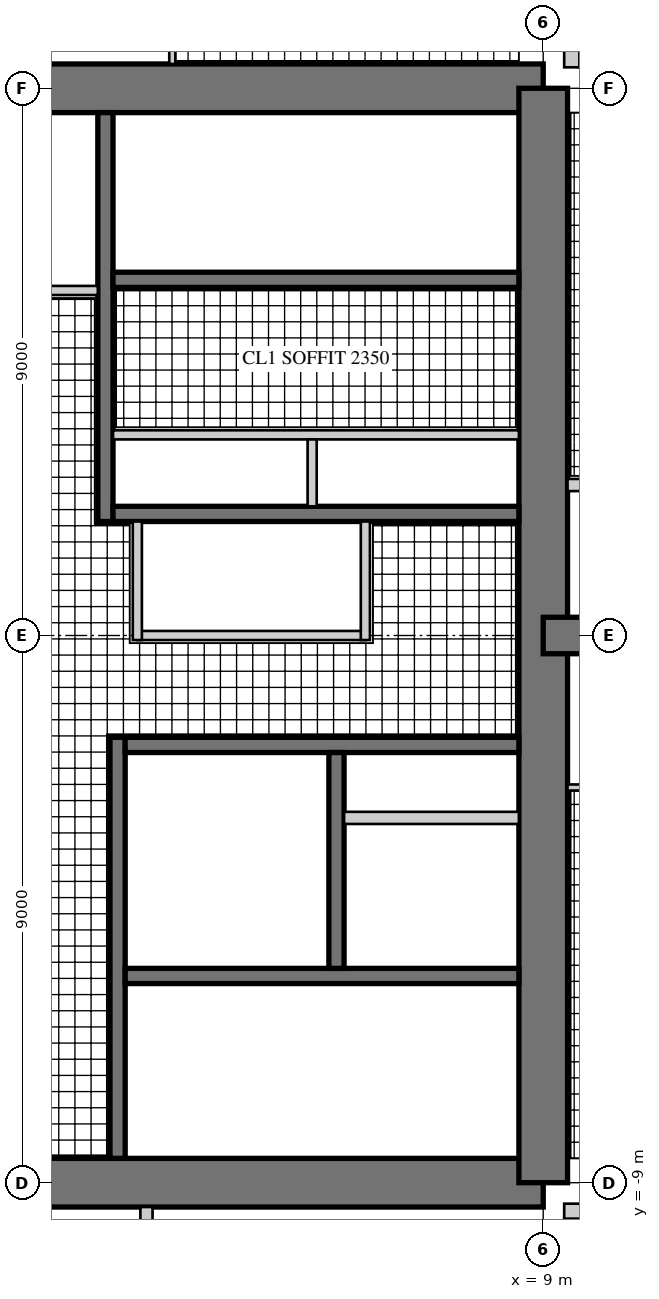
"""IFC4 building model, lengths in metres.
Left out: names, types, materials, properties, quantities, classifications, styles, units other than length and angle.
Written with IfcOpenShell. Run it as: python <this file> out.ifc"""

import sys

from ifc_helpers import new_model, si_unit, direction, frame, frame_2d, origin, place, context, subcontext, project, spatial, rectangle, extrude, element, fill, save


model = new_model("IFC4")
c1 = context("Model", 3, precision=1e-05, world=origin(), true_north=direction((0.0, 1.0)))
c2 = subcontext(c1, "Body", "Model", "MODEL_VIEW")
j1 = project(units=[si_unit("LENGTHUNIT", "METRE"), si_unit("PLANEANGLEUNIT", "RADIAN")], contexts=[c1])
p1 = place(None, origin())
s1 = spatial("IfcSite", under=j1, at=p1, CompositionType="ELEMENT")
p2 = place(p1, origin())
s2 = spatial("IfcBuilding", under=s1, at=p2, CompositionType="ELEMENT")
p3 = place(p2, frame((0.0, 0.0, 267.9)))
s3 = spatial("IfcBuildingStorey", under=s2, at=p3, CompositionType="ELEMENT", Elevation=267.9)
p4 = place(p3, frame((9.0, 9.0, 0.0), z_axis=(0.0, 0.0, 1.0), x_axis=(-1.0, 0.0, 0.0)))
e1 = element("IfcWall", 1, at=p4, inside=s3, PredefinedType="SHEAR", context=c2, shape_type="SweptSolid", body=[
    extrude(rectangle(XDim=18.0, YDim=0.8, at=frame_2d((9.0, 0.0))), origin(), (0.0, 0.0, 1.0), 3.4),
])
p5 = place(p4, frame((9.8, 0.0, 0.0)))
e2 = element("IfcOpeningElement", 2, at=p5, cuts=e1, PredefinedType="OPENING", context=c2, shape_type="SweptSolid", body=[
    extrude(rectangle(XDim=1.0, YDim=2.4, at=frame_2d((0.5, 1.2))), frame((0.0, 0.41, 0.0), z_axis=(0.0, -1.0, 0.0), x_axis=(1.0, 0.0, 0.0)), (0.0, 0.0, 1.0), 0.82),
])
p6 = place(p3, frame((-9.0, -9.0, 0.0), z_axis=(0.0, 0.0, 1.0), x_axis=(1.0, 0.0, 0.0)))
e3 = element("IfcWall", 3, at=p6, inside=s3, PredefinedType="SHEAR", context=c2, shape_type="SweptSolid", body=[
    extrude(rectangle(XDim=18.0, YDim=0.8, at=frame_2d((9.0, 0.0))), origin(), (0.0, 0.0, 1.0), 3.4),
])
p7 = place(p6, frame((9.8, 0.0, 0.0)))
e4 = element("IfcOpeningElement", 4, at=p7, cuts=e3, PredefinedType="OPENING", context=c2, shape_type="SweptSolid", body=[
    extrude(rectangle(XDim=1.0, YDim=2.4, at=frame_2d((0.5, 1.2))), frame((0.0, 0.41, 0.0), z_axis=(0.0, -1.0, 0.0), x_axis=(1.0, 0.0, 0.0)), (0.0, 0.0, 1.0), 0.82),
])
p8 = place(p3, frame((9.0, -9.0, 0.0), z_axis=(0.0, 0.0, 1.0), x_axis=(0.0, 1.0, 0.0)))
e5 = element("IfcWall", 5, at=p8, inside=s3, PredefinedType="SHEAR", context=c2, shape_type="SweptSolid", body=[
    extrude(rectangle(XDim=18.0, YDim=0.8, at=frame_2d((9.0, 0.0))), origin(), (0.0, 0.0, 1.0), 3.4),
])
p9 = place(p8, frame((9.8, 0.0, 0.0)))
e6 = element("IfcOpeningElement", 6, at=p9, cuts=e5, PredefinedType="OPENING", context=c2, shape_type="SweptSolid", body=[
    extrude(rectangle(XDim=1.0, YDim=2.4, at=frame_2d((0.5, 1.2))), frame((0.0, 0.41, 0.0), z_axis=(0.0, -1.0, 0.0), x_axis=(1.0, 0.0, 0.0)), (0.0, 0.0, 1.0), 0.82),
])
p10 = place(p3, frame((1.8, 1.875, 0.0), z_axis=(0.0, 0.0, 1.0), x_axis=(0.0, 1.0, 0.0)))
e7 = element("IfcWall", 7, at=p10, inside=s3, PredefinedType="SHEAR", context=c2, shape_type="SweptSolid", body=[
    extrude(rectangle(XDim=6.725, YDim=0.25, at=frame_2d((3.363, 0.0))), origin(), (0.0, 0.0, 1.0), 3.4),
])
p11 = place(p10, frame((1.875, 0.0, 0.0)))
e8 = element("IfcOpeningElement", 8, at=p11, cuts=e7, PredefinedType="OPENING", context=c2, shape_type="SweptSolid", body=[
    extrude(rectangle(XDim=1.6, YDim=2.4, at=frame_2d((0.8, 1.2))), frame((0.0, 0.135, 0.0), z_axis=(0.0, -1.0, 0.0), x_axis=(1.0, 0.0, 0.0)), (0.0, 0.0, 1.0), 0.27),
])
p12 = place(p3, frame((1.925, 2.0, 0.0), z_axis=(0.0, 0.0, 1.0), x_axis=(1.0, 0.0, 0.0)))
e9 = element("IfcWall", 9, at=p12, inside=s3, PredefinedType="SHEAR", context=c2, shape_type="SweptSolid", body=[
    extrude(rectangle(XDim=6.675, YDim=0.25, at=frame_2d((3.337, 0.0))), origin(), (0.0, 0.0, 1.0), 3.4),
])
p13 = place(p3, frame((1.925, 5.85, 0.0), z_axis=(0.0, 0.0, 1.0), x_axis=(1.0, 0.0, 0.0)))
e10 = element("IfcWall", 10, at=p13, inside=s3, PredefinedType="SHEAR", context=c2, shape_type="SweptSolid", body=[
    extrude(rectangle(XDim=6.675, YDim=0.25, at=frame_2d((3.337, 0.0))), origin(), (0.0, 0.0, 1.0), 3.4),
])
p14 = place(p13, frame((0.546, 0.0, 0.0)))
e11 = element("IfcOpeningElement", 11, at=p14, cuts=e10, PredefinedType="OPENING", context=c2, shape_type="SweptSolid", body=[
    extrude(rectangle(XDim=1.0, YDim=2.1, at=frame_2d((0.5, 1.05))), frame((0.0, 0.135, 0.0), z_axis=(0.0, -1.0, 0.0), x_axis=(1.0, 0.0, 0.0)), (0.0, 0.0, 1.0), 0.27),
])
p15 = place(p3, frame((1.925, 3.3, 0.0), z_axis=(0.0, 0.0, 1.0), x_axis=(1.0, 0.0, 0.0)))
e12 = element("IfcWall", 12, at=p15, inside=s3, PredefinedType="PARTITIONING", context=c2, shape_type="SweptSolid", body=[
    extrude(rectangle(XDim=6.675, YDim=0.15, at=frame_2d((3.337, 0.0))), origin(), (0.0, 0.0, 1.0), 3.4),
])
p16 = place(p15, frame((0.075, 0.0, 0.0)))
e13 = element("IfcOpeningElement", 13, at=p16, cuts=e12, PredefinedType="OPENING", context=c2, shape_type="SweptSolid", body=[
    extrude(rectangle(XDim=0.8, YDim=2.1, at=frame_2d((0.4, 1.05))), frame((0.0, 0.085, 0.0), z_axis=(0.0, -1.0, 0.0), x_axis=(1.0, 0.0, 0.0)), (0.0, 0.0, 1.0), 0.17),
])
p17 = place(p15, frame((3.675, 0.0, 0.0)))
e14 = element("IfcOpeningElement", 14, at=p17, cuts=e12, PredefinedType="OPENING", context=c2, shape_type="SweptSolid", body=[
    extrude(rectangle(XDim=0.8, YDim=2.1, at=frame_2d((0.4, 1.05))), frame((0.0, 0.085, 0.0), z_axis=(0.0, -1.0, 0.0), x_axis=(1.0, 0.0, 0.0)), (0.0, 0.0, 1.0), 0.17),
])
p18 = place(p3, frame((5.2, 2.125, 0.0), z_axis=(0.0, 0.0, 1.0), x_axis=(0.0, 1.0, 0.0)))
e15 = element("IfcWall", 15, at=p18, inside=s3, PredefinedType="PARTITIONING", context=c2, shape_type="SweptSolid", body=[
    extrude(rectangle(XDim=1.1, YDim=0.15, at=frame_2d((0.55, 0.0))), origin(), (0.0, 0.0, 1.0), 3.4),
])
p19 = place(p3, frame((2.0, -1.675, 0.0), z_axis=(0.0, 0.0, 1.0), x_axis=(0.0, -1.0, 0.0)))
e16 = element("IfcWall", 16, at=p19, inside=s3, PredefinedType="SHEAR", context=c2, shape_type="SweptSolid", body=[
    extrude(rectangle(XDim=6.925, YDim=0.25, at=frame_2d((3.462, 0.0))), origin(), (0.0, 0.0, 1.0), 3.4),
])
p20 = place(p19, frame((0.725, 0.0, 0.0)))
e17 = element("IfcOpeningElement", 17, at=p20, cuts=e16, PredefinedType="OPENING", context=c2, shape_type="SweptSolid", body=[
    extrude(rectangle(XDim=1.0, YDim=2.1, at=frame_2d((0.5, 1.05))), frame((0.0, 0.135, 0.0), z_axis=(0.0, -1.0, 0.0), x_axis=(1.0, 0.0, 0.0)), (0.0, 0.0, 1.0), 0.27),
])
p21 = place(p3, frame((2.125, -1.8, 0.0), z_axis=(0.0, 0.0, 1.0), x_axis=(1.0, 0.0, 0.0)))
e18 = element("IfcWall", 18, at=p21, inside=s3, PredefinedType="SHEAR", context=c2, shape_type="SweptSolid", body=[
    extrude(rectangle(XDim=6.475, YDim=0.25, at=frame_2d((3.238, 0.0))), origin(), (0.0, 0.0, 1.0), 3.4),
])
p22 = place(p3, frame((2.125, -5.6, 0.0), z_axis=(0.0, 0.0, 1.0), x_axis=(1.0, 0.0, 0.0)))
e19 = element("IfcWall", 19, at=p22, inside=s3, PredefinedType="SHEAR", context=c2, shape_type="SweptSolid", body=[
    extrude(rectangle(XDim=6.475, YDim=0.25, at=frame_2d((3.238, 0.0))), origin(), (0.0, 0.0, 1.0), 3.4),
])
p23 = place(p22, frame((0.175, 0.0, 0.0)))
e20 = element("IfcOpeningElement", 20, at=p23, cuts=e19, PredefinedType="OPENING", context=c2, shape_type="SweptSolid", body=[
    extrude(rectangle(XDim=1.0, YDim=2.1, at=frame_2d((0.5, 1.05))), frame((0.0, 0.135, 0.0), z_axis=(0.0, -1.0, 0.0), x_axis=(1.0, 0.0, 0.0)), (0.0, 0.0, 1.0), 0.27),
])
p24 = place(p3, frame((5.6, -1.925, 0.0), z_axis=(0.0, 0.0, 1.0), x_axis=(0.0, -1.0, 0.0)))
e21 = element("IfcWall", 21, at=p24, inside=s3, PredefinedType="SHEAR", context=c2, shape_type="SweptSolid", body=[
    extrude(rectangle(XDim=3.55, YDim=0.25, at=frame_2d((1.775, 0.0))), origin(), (0.0, 0.0, 1.0), 3.4),
])
p25 = place(p24, frame((1.525, 0.0, 0.0)))
e22 = element("IfcOpeningElement", 22, at=p25, cuts=e21, PredefinedType="OPENING", context=c2, shape_type="SweptSolid", body=[
    extrude(rectangle(XDim=1.1, YDim=2.2, at=frame_2d((0.55, 1.1))), frame((0.0, 0.135, 0.0), z_axis=(0.0, -1.0, 0.0), x_axis=(1.0, 0.0, 0.0)), (0.0, 0.0, 1.0), 0.27),
])
p26 = place(p24, frame((0.075, 0.0, 0.0)))
e23 = element("IfcOpeningElement", 23, at=p26, cuts=e21, PredefinedType="OPENING", context=c2, shape_type="SweptSolid", body=[
    extrude(rectangle(XDim=0.8, YDim=2.1, at=frame_2d((0.4, 1.05))), frame((0.0, 0.135, 0.0), z_axis=(0.0, -1.0, 0.0), x_axis=(1.0, 0.0, 0.0)), (0.0, 0.0, 1.0), 0.27),
])
p27 = place(p3, frame((5.725, -3.0, 0.0), z_axis=(0.0, 0.0, 1.0), x_axis=(1.0, 0.0, 0.0)))
e24 = element("IfcWall", 24, at=p27, inside=s3, PredefinedType="PARTITIONING", context=c2, shape_type="SweptSolid", body=[
    extrude(rectangle(XDim=2.875, YDim=0.2, at=frame_2d((1.438, 0.0))), origin(), (0.0, 0.0, 1.0), 3.4),
])
p28 = place(p3, frame((9.0, 0.0, 0.0), z_axis=(0.0, 0.0, 1.0), x_axis=(1.0, 0.0, 0.0)))
e25 = element("IfcWall", 25, at=p28, inside=s3, PredefinedType="SHEAR", context=c2, shape_type="SweptSolid", body=[
    extrude(rectangle(XDim=9.0, YDim=0.6, at=frame_2d((4.5, 0.0))), origin(), (0.0, 0.0, 1.0), 3.4),
])
p29 = place(p28, frame((3.8, 0.0, 0.0)))
e26 = element("IfcOpeningElement", 26, at=p29, cuts=e25, PredefinedType="OPENING", context=c2, shape_type="SweptSolid", body=[
    extrude(rectangle(XDim=1.0, YDim=2.15, at=frame_2d((0.5, 1.075))), frame((0.0, 0.31, 0.0), z_axis=(0.0, -1.0, 0.0), x_axis=(1.0, 0.0, 0.0)), (0.0, 0.0, 1.0), 0.62),
])
p30 = place(p28, frame((7.0, 0.0, 0.0)))
e27 = element("IfcOpeningElement", 27, at=p30, cuts=e25, PredefinedType="OPENING", context=c2, shape_type="SweptSolid", body=[
    extrude(rectangle(XDim=1.0, YDim=2.2, at=frame_2d((0.5, 1.1))), frame((0.0, 0.31, 0.0), z_axis=(0.0, -1.0, 0.0), x_axis=(1.0, 0.0, 0.0)), (0.0, 0.0, 1.0), 0.62),
])
p31 = place(p3, frame((9.345, -9.47, 0.0), z_axis=(0.0, 0.0, 1.0), x_axis=(1.0, 0.0, 0.0)))
e28 = element("IfcWall", 28, at=p31, inside=s3, PredefinedType="SOLIDWALL", context=c2, shape_type="SweptSolid", body=[
    extrude(rectangle(XDim=3.125, YDim=0.25, at=frame_2d((1.562, 0.0))), origin(), (0.0, 0.0, 1.0), 3.22),
])
p32 = place(p31, frame((0.6, 0.0, 0.0)))
e29 = element("IfcOpeningElement", 29, at=p32, cuts=e28, PredefinedType="OPENING", context=c2, shape_type="SweptSolid", body=[
    extrude(rectangle(XDim=1.0, YDim=2.2, at=frame_2d((0.5, 1.1))), frame((0.0, 0.135, 0.0), z_axis=(0.0, -1.0, 0.0), x_axis=(1.0, 0.0, 0.0)), (0.0, 0.0, 1.0), 0.27),
])
p33 = place(p3, frame((12.47, 9.47, 0.0), z_axis=(0.0, 0.0, 1.0), x_axis=(-1.0, 0.0, 0.0)))
e30 = element("IfcWall", 30, at=p33, inside=s3, PredefinedType="SOLIDWALL", context=c2, shape_type="SweptSolid", body=[
    extrude(rectangle(XDim=2.875, YDim=0.25, at=frame_2d((1.438, 0.0))), origin(), (0.0, 0.0, 1.0), 3.22),
])
p34 = place(p33, frame((0.6, 0.0, 0.0)))
e31 = element("IfcOpeningElement", 31, at=p34, cuts=e30, PredefinedType="OPENING", context=c2, shape_type="SweptSolid", body=[
    extrude(rectangle(XDim=1.0, YDim=2.2, at=frame_2d((0.5, 1.1))), frame((0.0, 0.135, 0.0), z_axis=(0.0, -1.0, 0.0), x_axis=(1.0, 0.0, 0.0)), (0.0, 0.0, 1.0), 0.27),
])
p35 = place(p3, frame((9.47, 9.345, 0.0), z_axis=(0.0, 0.0, 1.0), x_axis=(0.0, 1.0, 0.0)))
e32 = element("IfcWall", 32, at=p35, inside=s3, PredefinedType="SOLIDWALL", context=c2, shape_type="SweptSolid", body=[
    extrude(rectangle(XDim=3.125, YDim=0.25, at=frame_2d((1.562, 0.0))), origin(), (0.0, 0.0, 1.0), 3.22),
])
p36 = place(p35, frame((0.6, 0.0, 0.0)))
e33 = element("IfcOpeningElement", 33, at=p36, cuts=e32, PredefinedType="OPENING", context=c2, shape_type="SweptSolid", body=[
    extrude(rectangle(XDim=1.0, YDim=2.2, at=frame_2d((0.5, 1.1))), frame((0.0, 0.135, 0.0), z_axis=(0.0, -1.0, 0.0), x_axis=(1.0, 0.0, 0.0)), (0.0, 0.0, 1.0), 0.27),
])
p37 = place(p3, frame((9.47, -12.47, 0.0), z_axis=(0.0, 0.0, 1.0), x_axis=(0.0, 1.0, 0.0)))
e34 = element("IfcWall", 34, at=p37, inside=s3, PredefinedType="SOLIDWALL", context=c2, shape_type="SweptSolid", body=[
    extrude(rectangle(XDim=2.875, YDim=0.25, at=frame_2d((1.438, 0.0))), origin(), (0.0, 0.0, 1.0), 3.22),
])
p38 = place(p37, frame((0.6, 0.0, 0.0)))
e35 = element("IfcOpeningElement", 35, at=p38, cuts=e34, PredefinedType="OPENING", context=c2, shape_type="SweptSolid", body=[
    extrude(rectangle(XDim=1.0, YDim=2.2, at=frame_2d((0.5, 1.1))), frame((0.0, 0.135, 0.0), z_axis=(0.0, -1.0, 0.0), x_axis=(1.0, 0.0, 0.0)), (0.0, 0.0, 1.0), 0.27),
])
p39 = place(p3, frame((2.325, 0.0, 0.0), z_axis=(0.0, 0.0, 1.0), x_axis=(1.0, 0.0, 0.0)))
e36 = element("IfcWall", 36, at=p39, inside=s3, PredefinedType="PARTITIONING", context=c2, shape_type="SweptSolid", body=[
    extrude(rectangle(XDim=3.75, YDim=0.15, at=frame_2d((1.875, 0.0))), origin(), (0.0, 0.0, 1.0), 3.22),
])
p40 = place(p39, frame((0.4, 0.0, 0.0)))
e37 = element("IfcOpeningElement", 37, at=p40, cuts=e36, PredefinedType="OPENING", context=c2, shape_type="SweptSolid", body=[
    extrude(rectangle(XDim=1.0, YDim=2.1, at=frame_2d((0.5, 1.05))), frame((0.0, 0.085, 0.0), z_axis=(0.0, -1.0, 0.0), x_axis=(1.0, 0.0, 0.0)), (0.0, 0.0, 1.0), 0.17),
])
for number, where, z_axis, x_axis in (
    (38, (2.325, 1.875, 0.0), (0.0, 0.0, 1.0), (0.0, -1.0, 0.0)),
    (39, (6.075, -0.075, 0.0), (0.0, 0.0, 1.0), (0.0, 1.0, 0.0)),
):
    element("IfcWall", number, at=place(p3, frame(where, z_axis=z_axis, x_axis=x_axis)), inside=s3, PredefinedType="PARTITIONING", context=c2, shape_type="SweptSolid", body=[
        extrude(rectangle(XDim=1.95, YDim=0.15, at=frame_2d((0.975, 0.0))), origin(), (0.0, 0.0, 1.0), 3.22),
    ])
p41 = place(p3, frame((1.675, 5.675, 0.0), z_axis=(0.0, 0.0, 1.0), x_axis=(-1.0, 0.0, 0.0)))
e40 = element("IfcWall", 40, at=p41, inside=s3, PredefinedType="PARTITIONING", context=c2, shape_type="SweptSolid", body=[
    extrude(rectangle(XDim=1.75, YDim=0.15, at=frame_2d((0.875, 0.0))), origin(), (0.0, 0.0, 1.0), 3.22),
])
p42 = place(p3, frame((2.9, 9.4, 0.0), z_axis=(0.0, 0.0, 1.0), x_axis=(0.0, 1.0, 0.0)))
e41 = element("IfcWall", 41, at=p42, inside=s3, PredefinedType="PARTITIONING", context=c2, shape_type="SweptSolid", body=[
    extrude(rectangle(XDim=2.85, YDim=0.1, at=frame_2d((1.425, 0.0))), origin(), (0.0, 0.0, 1.0), 3.22),
])
p43 = place(p3, frame((9.4, -2.5, 0.0), z_axis=(0.0, 0.0, 1.0), x_axis=(1.0, 0.0, 0.0)))
e42 = element("IfcWall", 42, at=p43, inside=s3, PredefinedType="PARTITIONING", context=c2, shape_type="SweptSolid", body=[
    extrude(rectangle(XDim=2.65, YDim=0.1, at=frame_2d((1.325, 0.0))), origin(), (0.0, 0.0, 1.0), 3.22),
])
p44 = place(p3, frame((9.4, 2.475, 0.0), z_axis=(0.0, 0.0, 1.0), x_axis=(1.0, 0.0, 0.0)))
e43 = element("IfcWall", 43, at=p44, inside=s3, PredefinedType="SOLIDWALL", context=c2, shape_type="SweptSolid", body=[
    extrude(rectangle(XDim=5.6, YDim=0.2, at=frame_2d((2.8, 0.0))), origin(), (0.0, 0.0, 1.0), 3.22),
])
p45 = place(p44, frame((1.2, 0.0, 0.0)))
e44 = element("IfcOpeningElement", 44, at=p45, cuts=e43, PredefinedType="OPENING", context=c2, shape_type="SweptSolid", body=[
    extrude(rectangle(XDim=1.0, YDim=2.2, at=frame_2d((0.5, 1.1))), frame((0.0, 0.11, 0.0), z_axis=(0.0, -1.0, 0.0), x_axis=(1.0, 0.0, 0.0)), (0.0, 0.0, 1.0), 0.22),
])
p46 = place(p3, frame((2.475, -9.4, 0.0), z_axis=(0.0, 0.0, 1.0), x_axis=(0.0, -1.0, 0.0)))
e45 = element("IfcWall", 45, at=p46, inside=s3, PredefinedType="SOLIDWALL", context=c2, shape_type="SweptSolid", body=[
    extrude(rectangle(XDim=5.6, YDim=0.2, at=frame_2d((2.8, 0.0))), origin(), (0.0, 0.0, 1.0), 3.22),
])
p47 = place(p46, frame((1.2, 0.0, 0.0)))
e46 = element("IfcOpeningElement", 46, at=p47, cuts=e45, PredefinedType="OPENING", context=c2, shape_type="SweptSolid", body=[
    extrude(rectangle(XDim=1.0, YDim=2.2, at=frame_2d((0.5, 1.1))), frame((0.0, 0.11, 0.0), z_axis=(0.0, -1.0, 0.0), x_axis=(1.0, 0.0, 0.0)), (0.0, 0.0, 1.0), 0.22),
])
p48 = place(p40, origin())
e47 = element("IfcDoor", 47, at=p48, inside=s3, OperationType="SINGLE_SWING_LEFT", PredefinedType="DOOR", context=c2, shape_type="SweptSolid", body=[
    extrude(rectangle(XDim=1.0, YDim=2.1, at=frame_2d((0.5, 1.05))), frame((0.0, 0.025, 0.0), z_axis=(0.0, -1.0, 0.0), x_axis=(1.0, 0.0, 0.0)), (0.0, 0.0, 1.0), 0.05),
])
fill(e37, e47)
p49 = place(p7, origin())
e48 = element("IfcDoor", 48, at=p49, inside=s3, OperationType="SINGLE_SWING_RIGHT", PredefinedType="DOOR", context=c2, shape_type="SweptSolid", body=[
    extrude(rectangle(XDim=1.0, YDim=2.4, at=frame_2d((0.5, 1.2))), frame((0.0, 0.055, 0.0), z_axis=(0.0, -1.0, 0.0), x_axis=(1.0, 0.0, 0.0)), (0.0, 0.0, 1.0), 0.05),
])
fill(e4, e48)
p50 = place(p9, origin())
e49 = element("IfcDoor", 49, at=p50, inside=s3, OperationType="SINGLE_SWING_RIGHT", PredefinedType="DOOR", context=c2, shape_type="SweptSolid", body=[
    extrude(rectangle(XDim=1.0, YDim=2.4, at=frame_2d((0.5, 1.2))), frame((0.0, 0.055, 0.0), z_axis=(0.0, -1.0, 0.0), x_axis=(1.0, 0.0, 0.0)), (0.0, 0.0, 1.0), 0.05),
])
fill(e6, e49)
p51 = place(p11, frame((1.6, 0.0, 0.0), z_axis=(0.0, 0.0, 1.0), x_axis=(-1.0, 0.0, 0.0)))
e50 = element("IfcDoor", 50, at=p51, inside=s3, OperationType="DOUBLE_DOOR_SINGLE_SWING", PredefinedType="DOOR", context=c2, shape_type="SweptSolid", body=[
    extrude(rectangle(XDim=1.6, YDim=2.4, at=frame_2d((0.8, 1.2))), frame((0.0, 0.025, 0.0), z_axis=(0.0, -1.0, 0.0), x_axis=(1.0, 0.0, 0.0)), (0.0, 0.0, 1.0), 0.05),
])
fill(e8, e50)
p52 = place(p16, frame((0.8, 0.0, 0.0), z_axis=(0.0, 0.0, 1.0), x_axis=(-1.0, 0.0, 0.0)))
e51 = element("IfcDoor", 51, at=p52, inside=s3, OperationType="SINGLE_SWING_RIGHT", PredefinedType="DOOR", context=c2, shape_type="SweptSolid", body=[
    extrude(rectangle(XDim=0.8, YDim=2.1, at=frame_2d((0.4, 1.05))), frame((0.0, 0.025, 0.0), z_axis=(0.0, -1.0, 0.0), x_axis=(1.0, 0.0, 0.0)), (0.0, 0.0, 1.0), 0.05),
])
fill(e13, e51)
p53 = place(p17, frame((0.8, 0.0, 0.0), z_axis=(0.0, 0.0, 1.0), x_axis=(-1.0, 0.0, 0.0)))
e52 = element("IfcDoor", 52, at=p53, inside=s3, OperationType="SINGLE_SWING_RIGHT", PredefinedType="DOOR", context=c2, shape_type="SweptSolid", body=[
    extrude(rectangle(XDim=0.8, YDim=2.1, at=frame_2d((0.4, 1.05))), frame((0.0, 0.025, 0.0), z_axis=(0.0, -1.0, 0.0), x_axis=(1.0, 0.0, 0.0)), (0.0, 0.0, 1.0), 0.05),
])
fill(e14, e52)
p54 = place(p20, origin())
e53 = element("IfcDoor", 53, at=p54, inside=s3, OperationType="SINGLE_SWING_LEFT", PredefinedType="DOOR", context=c2, shape_type="SweptSolid", body=[
    extrude(rectangle(XDim=1.0, YDim=2.1, at=frame_2d((0.5, 1.05))), frame((0.0, 0.025, 0.0), z_axis=(0.0, -1.0, 0.0), x_axis=(1.0, 0.0, 0.0)), (0.0, 0.0, 1.0), 0.05),
])
fill(e17, e53)
p55 = place(p23, frame((1.0, 0.0, 0.0), z_axis=(0.0, 0.0, 1.0), x_axis=(-1.0, 0.0, 0.0)))
e54 = element("IfcDoor", 54, at=p55, inside=s3, OperationType="SINGLE_SWING_RIGHT", PredefinedType="DOOR", context=c2, shape_type="SweptSolid", body=[
    extrude(rectangle(XDim=1.0, YDim=2.1, at=frame_2d((0.5, 1.05))), frame((0.0, 0.025, 0.0), z_axis=(0.0, -1.0, 0.0), x_axis=(1.0, 0.0, 0.0)), (0.0, 0.0, 1.0), 0.05),
])
fill(e20, e54)
p56 = place(p25, origin())
e55 = element("IfcDoor", 55, at=p56, inside=s3, OperationType="DOUBLE_DOOR_SLIDING", PredefinedType="DOOR", context=c2, shape_type="SweptSolid", body=[
    extrude(rectangle(XDim=1.1, YDim=2.2, at=frame_2d((0.55, 1.1))), frame((0.0, 0.025, 0.0), z_axis=(0.0, -1.0, 0.0), x_axis=(1.0, 0.0, 0.0)), (0.0, 0.0, 1.0), 0.05),
])
fill(e22, e55)
p57 = place(p26, origin())
e56 = element("IfcDoor", 56, at=p57, inside=s3, OperationType="SINGLE_SWING_LEFT", PredefinedType="DOOR", context=c2, shape_type="SweptSolid", body=[
    extrude(rectangle(XDim=0.8, YDim=2.1, at=frame_2d((0.4, 1.05))), frame((0.0, 0.025, 0.0), z_axis=(0.0, -1.0, 0.0), x_axis=(1.0, 0.0, 0.0)), (0.0, 0.0, 1.0), 0.05),
])
fill(e23, e56)
p58 = place(p14, origin())
e57 = element("IfcDoor", 57, at=p58, inside=s3, OperationType="SINGLE_SWING_LEFT", PredefinedType="DOOR", context=c2, shape_type="SweptSolid", body=[
    extrude(rectangle(XDim=1.0, YDim=2.1, at=frame_2d((0.5, 1.05))), frame((0.0, 0.025, 0.0), z_axis=(0.0, -1.0, 0.0), x_axis=(1.0, 0.0, 0.0)), (0.0, 0.0, 1.0), 0.05),
])
fill(e11, e57)
save(model, sys.argv[1])
